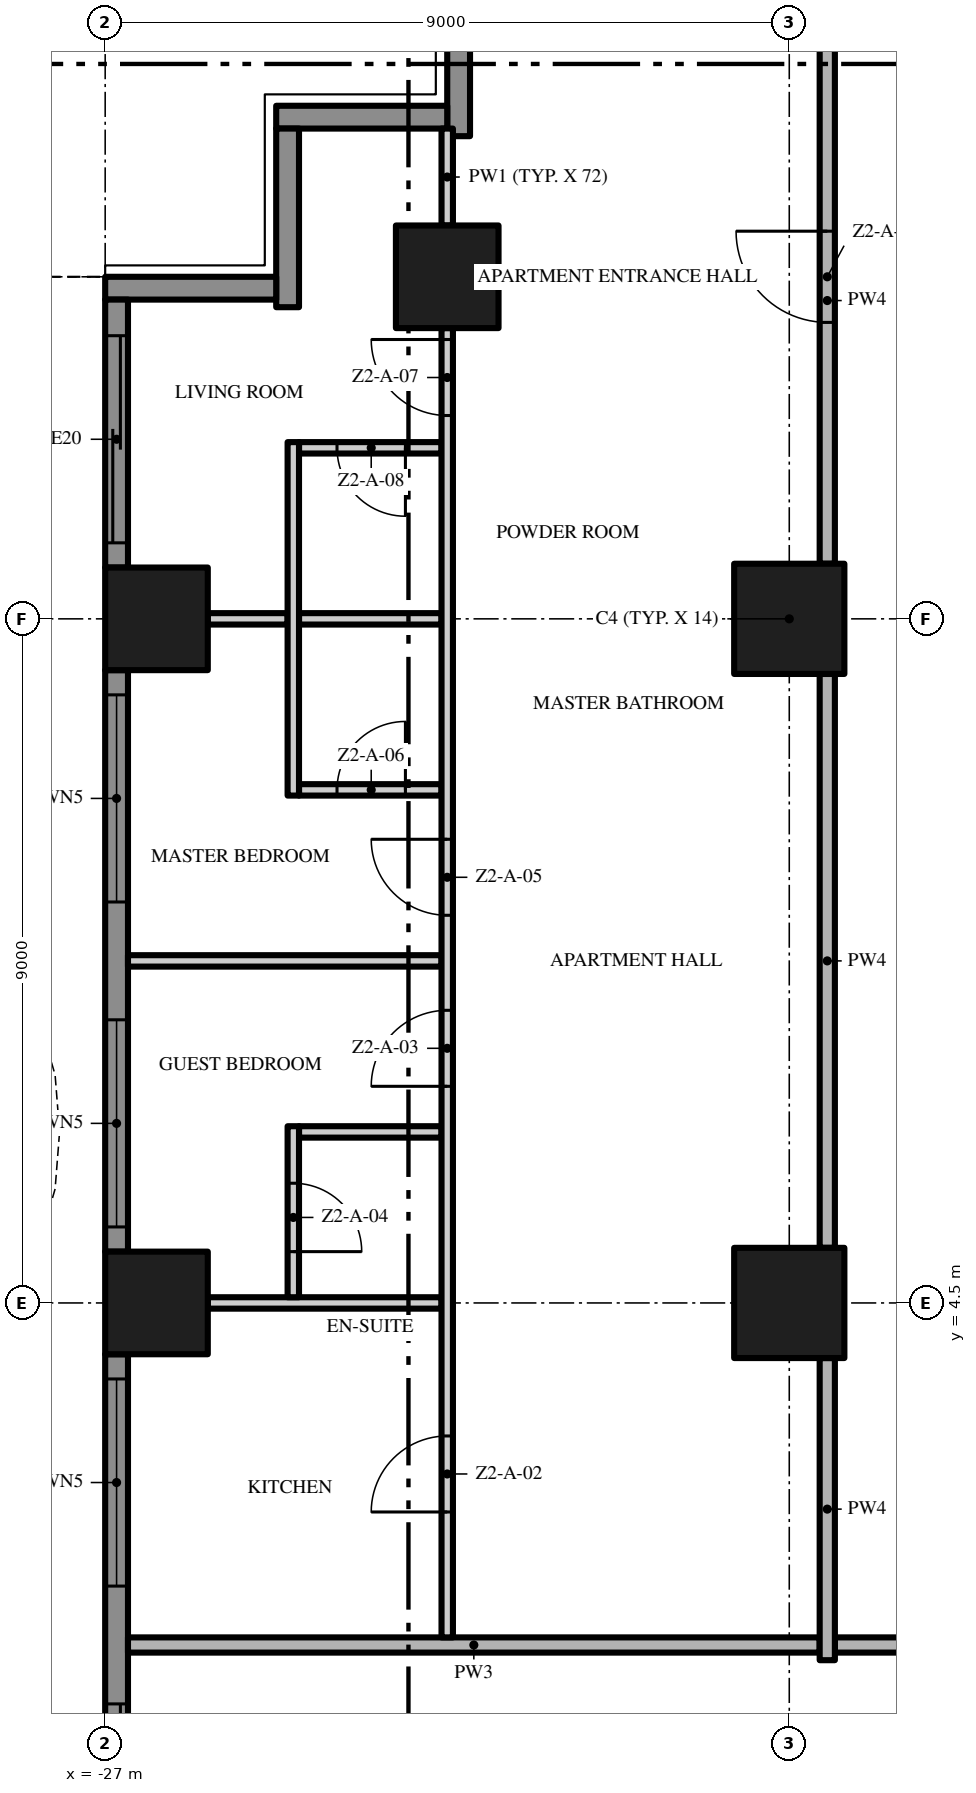
"""IFC4 building model, lengths in metres.
Left out: names, types, materials, properties, quantities, classifications, styles, units other than length and angle.
Written with IfcOpenShell. Run it as: python <this file> out.ifc"""

import sys

from ifc_helpers import new_model, si_unit, direction, frame, frame_2d, origin, origin_2d, place, context, subcontext, project, spatial, polyline, rectangle, outline, extrude, element, fill, save


model = new_model("IFC4")
c1 = context("Model", 3, precision=1e-05, world=origin(), true_north=direction((0.0, 1.0)))
c2 = subcontext(c1, "Body", "Model", "MODEL_VIEW")
j1 = project(units=[si_unit("LENGTHUNIT", "METRE"), si_unit("PLANEANGLEUNIT", "RADIAN")], contexts=[c1])
p1 = place(None, origin())
s1 = spatial("IfcSite", under=j1, at=p1, CompositionType="ELEMENT")
p2 = place(p1, origin())
s2 = spatial("IfcBuilding", under=s1, at=p2, CompositionType="ELEMENT")
p3 = place(p2, frame((0.0, 0.0, 77.0)))
s3 = spatial("IfcBuildingStorey", under=s2, at=p3, CompositionType="ELEMENT", Elevation=77.0)
for number, where, z_axis, x_axis in (
    (1, (-18.0, 13.5, 0.0), (0.0, 0.0, 1.0), (1.0, 0.0, 0.0)),
    (2, (-18.0, 4.5, 0.0), (0.0, 0.0, 1.0), (1.0, 0.0, 0.0)),
):
    element("IfcColumn", number, at=place(p3, frame(where, z_axis=z_axis, x_axis=x_axis)), inside=s3, PredefinedType="COLUMN", context=c2, shape_type="SweptSolid", body=[
        extrude(rectangle(XDim=1.45, YDim=1.45, at=origin_2d()), origin(), (0.0, 0.0, 1.0), 3.5),
    ])
for number, where, z_axis, x_axis in (
    (3, (-26.325, 13.5, 0.0), (0.0, 0.0, 1.0), (1.0, 0.0, 0.0)),
    (4, (-22.5, 18.0, 0.0), (0.0, 0.0, 1.0), (1.0, 0.0, 0.0)),
    (5, (-26.325, 4.5, 0.0), (0.0, 0.0, 1.0), (1.0, 0.0, 0.0)),
):
    element("IfcColumn", number, at=place(p3, frame(where, z_axis=z_axis, x_axis=x_axis)), inside=s3, PredefinedType="COLUMN", context=c2, shape_type="SweptSolid", body=[
        extrude(rectangle(XDim=1.35, YDim=1.35, at=origin_2d()), origin(), (0.0, 0.0, 1.0), 3.5),
    ])
p4 = place(p3, frame((-22.35, 19.85, 0.0), z_axis=(0.0, 0.0, 1.0), x_axis=(0.0, 1.0, 0.0)))
e6 = element("IfcWall", 6, at=p4, inside=s3, PredefinedType="SOLIDWALL", context=c2, shape_type="SweptSolid", body=[
    extrude(rectangle(XDim=2.35, YDim=0.3, at=frame_2d((1.175, 0.0))), origin(), (0.0, 0.0, 1.0), 3.5),
])
p5 = place(p3, frame((-24.75, 20.1, 0.0), z_axis=(0.0, 0.0, 1.0), x_axis=(1.0, 0.0, 0.0)))
e7 = element("IfcWall", 7, at=p5, inside=s3, PredefinedType="SOLIDWALL", context=c2, shape_type="SweptSolid", body=[
    extrude(rectangle(XDim=2.25, YDim=0.3, at=frame_2d((1.125, 0.0))), origin(), (0.0, 0.0, 1.0), 3.5),
])
p6 = place(p3, frame((-24.6, 17.6, 0.0), z_axis=(0.0, 0.0, 1.0), x_axis=(0.0, 1.0, 0.0)))
e8 = element("IfcWall", 8, at=p6, inside=s3, PredefinedType="SOLIDWALL", context=c2, shape_type="SweptSolid", body=[
    extrude(rectangle(XDim=2.35, YDim=0.3, at=frame_2d((1.175, 0.0))), origin(), (0.0, 0.0, 1.0), 3.5),
])
p7 = place(p3, frame((-27.0, 17.85, 0.0), z_axis=(0.0, 0.0, 1.0), x_axis=(1.0, 0.0, 0.0)))
e9 = element("IfcWall", 9, at=p7, inside=s3, PredefinedType="SOLIDWALL", context=c2, shape_type="SweptSolid", body=[
    extrude(rectangle(XDim=2.25, YDim=0.3, at=frame_2d((1.125, 0.0))), origin(), (0.0, 0.0, 1.0), 3.5),
])
p8 = place(p3, frame((-26.85, 14.175, 0.0), z_axis=(0.0, 0.0, 1.0), x_axis=(0.0, 1.0, 0.0)))
e10 = element("IfcWall", 10, at=p8, inside=s3, PredefinedType="SOLIDWALL", context=c2, shape_type="SweptSolid", body=[
    extrude(rectangle(XDim=3.525, YDim=0.3, at=frame_2d((1.762, 0.0))), origin(), (0.0, 0.0, 1.0), 3.5),
])
p9 = place(p8, frame((0.325, 0.0, 0.0)))
e11 = element("IfcOpeningElement", 11, at=p9, cuts=e10, PredefinedType="OPENING", context=c2, shape_type="SweptSolid", body=[
    extrude(rectangle(XDim=2.725, YDim=2.4, at=frame_2d((1.363, 1.2))), frame((0.0, 0.16, 0.0), z_axis=(0.0, -1.0, 0.0), x_axis=(1.0, 0.0, 0.0)), (0.0, 0.0, 1.0), 0.32),
])
p10 = place(p3, frame((-26.85, 5.175, 0.0), z_axis=(0.0, 0.0, 1.0), x_axis=(0.0, 1.0, 0.0)))
e12 = element("IfcWall", 12, at=p10, inside=s3, PredefinedType="SOLIDWALL", context=c2, shape_type="SweptSolid", body=[
    extrude(rectangle(XDim=7.65, YDim=0.3, at=frame_2d((3.825, 0.0))), origin(), (0.0, 0.0, 1.0), 3.5),
])
p11 = place(p10, frame((4.6, 0.0, 0.45)))
e13 = element("IfcOpeningElement", 13, at=p11, cuts=e12, PredefinedType="OPENING", context=c2, shape_type="SweptSolid", body=[
    extrude(rectangle(XDim=2.725, YDim=2.65, at=frame_2d((1.363, 1.325))), frame((0.0, 0.16, 0.0), z_axis=(0.0, -1.0, 0.0), x_axis=(1.0, 0.0, 0.0)), (0.0, 0.0, 1.0), 0.32),
])
p12 = place(p10, frame((0.325, 0.0, 0.45)))
e14 = element("IfcOpeningElement", 14, at=p12, cuts=e12, PredefinedType="OPENING", context=c2, shape_type="SweptSolid", body=[
    extrude(rectangle(XDim=2.725, YDim=2.65, at=frame_2d((1.363, 1.325))), frame((0.0, 0.16, 0.0), z_axis=(0.0, -1.0, 0.0), x_axis=(1.0, 0.0, 0.0)), (0.0, 0.0, 1.0), 0.32),
])
p13 = place(p3, frame((-26.85, -3.825, 0.0), z_axis=(0.0, 0.0, 1.0), x_axis=(0.0, 1.0, 0.0)))
e15 = element("IfcWall", 15, at=p13, inside=s3, PredefinedType="SOLIDWALL", context=c2, shape_type="SweptSolid", body=[
    extrude(rectangle(XDim=7.65, YDim=0.3, at=frame_2d((3.825, 0.0))), origin(), (0.0, 0.0, 1.0), 3.5),
])
p14 = place(p13, frame((4.6, 0.0, 0.45)))
e16 = element("IfcOpeningElement", 16, at=p14, cuts=e15, PredefinedType="OPENING", context=c2, shape_type="SweptSolid", body=[
    extrude(rectangle(XDim=2.725, YDim=2.65, at=frame_2d((1.363, 1.325))), frame((0.0, 0.16, 0.0), z_axis=(0.0, -1.0, 0.0), x_axis=(1.0, 0.0, 0.0)), (0.0, 0.0, 1.0), 0.32),
])
p15 = place(p13, frame((0.325, 0.0, 0.0)))
e17 = element("IfcOpeningElement", 17, at=p15, cuts=e15, PredefinedType="OPENING", context=c2, shape_type="SweptSolid", body=[
    extrude(rectangle(XDim=2.725, YDim=2.4, at=frame_2d((1.363, 1.2))), frame((0.0, 0.16, 0.0), z_axis=(0.0, -1.0, 0.0), x_axis=(1.0, 0.0, 0.0)), (0.0, 0.0, 1.0), 0.32),
])
p16 = place(p3, origin())
e18 = element("IfcWall", 18, at=p16, inside=s3, PredefinedType="USERDEFINED", context=c2, shape_type="SweptSolid", body=[
    extrude(outline(polyline([(-28.8, 18.0), (-29.505, 16.5), (-29.941, 15.0), (-30.0, 14.25), (-29.941, 13.5), (-29.505, 12.0), (-28.8, 10.5), (-28.095, 9.0), (-27.659, 7.5), (-27.6, 6.75), (-27.659, 6.0), (-28.095, 4.5), (-28.8, 3.0), (-29.505, 1.5), (-29.941, 0.0), (-30.0, -0.75), (-29.941, -1.5), (-29.505, -3.0), (-28.8, -4.5), (-28.095, -6.0), (-27.659, -7.5), (-27.6, -8.25), (-27.659, -9.0), (-28.095, -10.5), (-28.8, -12.0), (-29.505, -13.5), (-29.941, -15.0), (-30.0, -15.75), (-29.941, -16.5), (-29.505, -18.0), (-29.265, -17.93), (-29.694, -16.455), (-29.749, -15.75), (-29.694, -15.045), (-29.271, -13.589), (-28.574, -12.106), (-27.86, -10.589), (-27.411, -9.045), (-27.349, -8.25), (-27.411, -7.455), (-27.86, -5.911), (-28.574, -4.394), (-29.271, -2.911), (-29.694, -1.455), (-29.749, -0.75), (-29.694, -0.045), (-29.271, 1.411), (-28.574, 2.894), (-27.86, 4.411), (-27.411, 5.955), (-27.349, 6.75), (-27.411, 7.545), (-27.86, 9.089), (-28.574, 10.606), (-29.271, 12.089), (-29.694, 13.545), (-29.749, 14.25), (-29.694, 14.955), (-29.271, 16.411), (-28.574, 17.894), (-28.8, 18.0)])), origin(), (0.0, 0.0, 1.0), 0.9),
])
p17 = place(p3, frame((-0.1, 0.0, 0.0), z_axis=(0.0, 0.0, 1.0), x_axis=(-1.0, 0.0, 0.0)))
e19 = element("IfcWall", 19, at=p17, inside=s3, PredefinedType="PARTITIONING", context=c2, shape_type="SweptSolid", body=[
    extrude(rectangle(XDim=17.3, YDim=0.2, at=frame_2d((8.65, 0.0))), origin(), (0.0, 0.0, 1.0), 3.5),
])
p18 = place(p17, frame((8.15, 0.0, 0.0)))
e20 = element("IfcOpeningElement", 20, at=p18, cuts=e19, PredefinedType="OPENING", context=c2, shape_type="SweptSolid", body=[
    extrude(rectangle(XDim=1.5, YDim=2.4, at=frame_2d((0.75, 1.2))), frame((0.0, 0.11, 0.0), z_axis=(0.0, -1.0, 0.0), x_axis=(1.0, 0.0, 0.0)), (0.0, 0.0, 1.0), 0.22),
])
p19 = place(p3, frame((-26.7, 0.0, 0.0), z_axis=(0.0, 0.0, 1.0), x_axis=(1.0, 0.0, 0.0)))
e21 = element("IfcWall", 21, at=p19, inside=s3, PredefinedType="PARTITIONING", context=c2, shape_type="SweptSolid", body=[
    extrude(rectangle(XDim=9.1, YDim=0.2, at=frame_2d((4.55, 0.0))), origin(), (0.0, 0.0, 1.0), 3.5),
])
p20 = place(p3, frame((-25.65, 4.5, 0.0), z_axis=(0.0, 0.0, 1.0), x_axis=(1.0, 0.0, 0.0)))
e22 = element("IfcWall", 22, at=p20, inside=s3, PredefinedType="PARTITIONING", context=c2, shape_type="SweptSolid", body=[
    extrude(rectangle(XDim=3.075, YDim=0.15, at=frame_2d((1.538, 0.0))), origin(), (0.0, 0.0, 1.0), 3.5),
])
p21 = place(p3, frame((-24.45, 6.75, 0.0), z_axis=(0.0, 0.0, 1.0), x_axis=(1.0, 0.0, 0.0)))
e23 = element("IfcWall", 23, at=p21, inside=s3, PredefinedType="PARTITIONING", context=c2, shape_type="SweptSolid", body=[
    extrude(rectangle(XDim=1.875, YDim=0.15, at=frame_2d((0.938, 0.0))), origin(), (0.0, 0.0, 1.0), 3.5),
])
p22 = place(p3, frame((-26.7, 9.0, 0.0), z_axis=(0.0, 0.0, 1.0), x_axis=(1.0, 0.0, 0.0)))
e24 = element("IfcWall", 24, at=p22, inside=s3, PredefinedType="PARTITIONING", context=c2, shape_type="SweptSolid", body=[
    extrude(rectangle(XDim=4.125, YDim=0.15, at=frame_2d((2.062, 0.0))), origin(), (0.0, 0.0, 1.0), 3.5),
])
p23 = place(p3, frame((-24.45, 11.25, 0.0), z_axis=(0.0, 0.0, 1.0), x_axis=(1.0, 0.0, 0.0)))
e25 = element("IfcWall", 25, at=p23, inside=s3, PredefinedType="PARTITIONING", context=c2, shape_type="SweptSolid", body=[
    extrude(rectangle(XDim=1.875, YDim=0.15, at=frame_2d((0.938, 0.0))), origin(), (0.0, 0.0, 1.0), 3.5),
])
p24 = place(p23, frame((0.5, 0.0, 0.0)))
e26 = element("IfcOpeningElement", 26, at=p24, cuts=e25, PredefinedType="OPENING", context=c2, shape_type="SweptSolid", body=[
    extrude(rectangle(XDim=0.9, YDim=2.1, at=frame_2d((0.45, 1.05))), frame((0.0, 0.085, 0.0), z_axis=(0.0, -1.0, 0.0), x_axis=(1.0, 0.0, 0.0)), (0.0, 0.0, 1.0), 0.17),
])
p25 = place(p3, frame((-25.65, 13.5, 0.0), z_axis=(0.0, 0.0, 1.0), x_axis=(1.0, 0.0, 0.0)))
e27 = element("IfcWall", 27, at=p25, inside=s3, PredefinedType="PARTITIONING", context=c2, shape_type="SweptSolid", body=[
    extrude(rectangle(XDim=1.05, YDim=0.15, at=frame_2d((0.525, 0.0))), origin(), (0.0, 0.0, 1.0), 3.5),
])
p26 = place(p3, frame((-24.45, 13.5, 0.0), z_axis=(0.0, 0.0, 1.0), x_axis=(1.0, 0.0, 0.0)))
e28 = element("IfcWall", 28, at=p26, inside=s3, PredefinedType="PARTITIONING", context=c2, shape_type="SweptSolid", body=[
    extrude(rectangle(XDim=1.875, YDim=0.15, at=frame_2d((0.938, 0.0))), origin(), (0.0, 0.0, 1.0), 3.5),
])
p27 = place(p3, frame((-22.575, 15.75, 0.0), z_axis=(0.0, 0.0, 1.0), x_axis=(-1.0, 0.0, 0.0)))
e29 = element("IfcWall", 29, at=p27, inside=s3, PredefinedType="PARTITIONING", context=c2, shape_type="SweptSolid", body=[
    extrude(rectangle(XDim=1.875, YDim=0.15, at=frame_2d((0.938, 0.0))), origin(), (0.0, 0.0, 1.0), 3.5),
])
p28 = place(p27, frame((0.475, 0.0, 0.0)))
e30 = element("IfcOpeningElement", 30, at=p28, cuts=e29, PredefinedType="OPENING", context=c2, shape_type="SweptSolid", body=[
    extrude(rectangle(XDim=0.9, YDim=2.1, at=frame_2d((0.45, 1.05))), frame((0.0, 0.085, 0.0), z_axis=(0.0, -1.0, 0.0), x_axis=(1.0, 0.0, 0.0)), (0.0, 0.0, 1.0), 0.17),
])
p29 = place(p3, frame((-24.525, 6.825, 0.0), z_axis=(0.0, 0.0, 1.0), x_axis=(0.0, -1.0, 0.0)))
e31 = element("IfcWall", 31, at=p29, inside=s3, PredefinedType="PARTITIONING", context=c2, shape_type="SweptSolid", body=[
    extrude(rectangle(XDim=2.25, YDim=0.15, at=frame_2d((1.125, 0.0))), origin(), (0.0, 0.0, 1.0), 3.5),
])
p30 = place(p29, frame((0.75, 0.0, 0.0)))
e32 = element("IfcOpeningElement", 32, at=p30, cuts=e31, PredefinedType="OPENING", context=c2, shape_type="SweptSolid", body=[
    extrude(rectangle(XDim=0.9, YDim=2.1, at=frame_2d((0.45, 1.05))), frame((0.0, 0.085, 0.0), z_axis=(0.0, -1.0, 0.0), x_axis=(1.0, 0.0, 0.0)), (0.0, 0.0, 1.0), 0.17),
])
p31 = place(p3, frame((-24.525, 11.175, 0.0), z_axis=(0.0, 0.0, 1.0), x_axis=(0.0, 1.0, 0.0)))
e33 = element("IfcWall", 33, at=p31, inside=s3, PredefinedType="PARTITIONING", context=c2, shape_type="SweptSolid", body=[
    extrude(rectangle(XDim=4.65, YDim=0.15, at=frame_2d((2.325, 0.0))), origin(), (0.0, 0.0, 1.0), 3.5),
])
p32 = place(p3, frame((-22.5, 0.1, 0.0), z_axis=(0.0, 0.0, 1.0), x_axis=(0.0, 1.0, 0.0)))
e34 = element("IfcWall", 34, at=p32, inside=s3, PredefinedType="PARTITIONING", context=c2, shape_type="SweptSolid", body=[
    extrude(rectangle(XDim=17.225, YDim=0.15, at=frame_2d((8.613, 0.0))), origin(), (0.0, 0.0, 1.0), 3.5),
])
p33 = place(p32, frame((1.65, 0.0, 0.0)))
e35 = element("IfcOpeningElement", 35, at=p33, cuts=e34, PredefinedType="OPENING", context=c2, shape_type="SweptSolid", body=[
    extrude(rectangle(XDim=1.0, YDim=2.4, at=frame_2d((0.5, 1.2))), frame((0.0, 0.085, 0.0), z_axis=(0.0, -1.0, 0.0), x_axis=(1.0, 0.0, 0.0)), (0.0, 0.0, 1.0), 0.17),
])
p34 = place(p32, frame((7.25, 0.0, 0.0)))
e36 = element("IfcOpeningElement", 36, at=p34, cuts=e34, PredefinedType="OPENING", context=c2, shape_type="SweptSolid", body=[
    extrude(rectangle(XDim=1.0, YDim=2.4, at=frame_2d((0.5, 1.2))), frame((0.0, 0.085, 0.0), z_axis=(0.0, -1.0, 0.0), x_axis=(1.0, 0.0, 0.0)), (0.0, 0.0, 1.0), 0.17),
])
p35 = place(p32, frame((9.5, 0.0, 0.0)))
e37 = element("IfcOpeningElement", 37, at=p35, cuts=e34, PredefinedType="OPENING", context=c2, shape_type="SweptSolid", body=[
    extrude(rectangle(XDim=1.0, YDim=2.4, at=frame_2d((0.5, 1.2))), frame((0.0, 0.085, 0.0), z_axis=(0.0, -1.0, 0.0), x_axis=(1.0, 0.0, 0.0)), (0.0, 0.0, 1.0), 0.17),
])
p36 = place(p32, frame((16.075, 0.0, 0.0)))
e38 = element("IfcOpeningElement", 38, at=p36, cuts=e34, PredefinedType="OPENING", context=c2, shape_type="SweptSolid", body=[
    extrude(rectangle(XDim=1.0, YDim=2.4, at=frame_2d((0.5, 1.2))), frame((0.0, 0.085, 0.0), z_axis=(0.0, -1.0, 0.0), x_axis=(1.0, 0.0, 0.0)), (0.0, 0.0, 1.0), 0.17),
])
p37 = place(p3, frame((-22.5, 18.675, 0.0), z_axis=(0.0, 0.0, 1.0), x_axis=(0.0, 1.0, 0.0)))
e39 = element("IfcWall", 39, at=p37, inside=s3, PredefinedType="PARTITIONING", context=c2, shape_type="SweptSolid", body=[
    extrude(rectangle(XDim=1.275, YDim=0.15, at=frame_2d((0.637, 0.0))), origin(), (0.0, 0.0, 1.0), 3.5),
])
p38 = place(p3, frame((-17.5, -0.2, 0.0), z_axis=(0.0, 0.0, 1.0), x_axis=(0.0, 1.0, 0.0)))
e40 = element("IfcWall", 40, at=p38, inside=s3, PredefinedType="PARTITIONING", context=c2, shape_type="SweptSolid", body=[
    extrude(rectangle(XDim=3.975, YDim=0.2, at=frame_2d((1.988, 0.0))), origin(), (0.0, 0.0, 1.0), 3.5),
])
p39 = place(p3, frame((-17.5, 5.225, 0.0), z_axis=(0.0, 0.0, 1.0), x_axis=(0.0, 1.0, 0.0)))
e41 = element("IfcWall", 41, at=p39, inside=s3, PredefinedType="PARTITIONING", context=c2, shape_type="SweptSolid", body=[
    extrude(rectangle(XDim=7.55, YDim=0.2, at=frame_2d((3.775, 0.0))), origin(), (0.0, 0.0, 1.0), 3.5),
])
p40 = place(p3, frame((-17.5, 14.225, 0.0), z_axis=(0.0, 0.0, 1.0), x_axis=(0.0, 1.0, 0.0)))
e42 = element("IfcWall", 42, at=p40, inside=s3, PredefinedType="PARTITIONING", context=c2, shape_type="SweptSolid", body=[
    extrude(rectangle(XDim=6.925, YDim=0.2, at=frame_2d((3.462, 0.0))), origin(), (0.0, 0.0, 1.0), 3.5),
])
p41 = place(p40, frame((3.175, 0.0, 0.0)))
e43 = element("IfcOpeningElement", 43, at=p41, cuts=e42, PredefinedType="OPENING", context=c2, shape_type="SweptSolid", body=[
    extrude(rectangle(XDim=1.2, YDim=2.4, at=frame_2d((0.6, 1.2))), frame((0.0, 0.11, 0.0), z_axis=(0.0, -1.0, 0.0), x_axis=(1.0, 0.0, 0.0)), (0.0, 0.0, 1.0), 0.22),
])
p42 = place(p9, origin())
e44 = element("IfcDoor", 44, at=p42, inside=s3, OperationType="SINGLE_SWING_LEFT", PredefinedType="DOOR", context=c2, shape_type="SweptSolid", body=[
    extrude(rectangle(XDim=2.725, YDim=2.4, at=frame_2d((1.363, 1.2))), frame((0.0, 0.025, 0.0), z_axis=(0.0, -1.0, 0.0), x_axis=(1.0, 0.0, 0.0)), (0.0, 0.0, 1.0), 0.05),
])
fill(e11, e44)
p43 = place(p11, origin())
e45 = element("IfcWindow", 45, at=p43, inside=s3, PartitioningType="SINGLE_PANEL", PredefinedType="WINDOW", context=c2, shape_type="SweptSolid", body=[
    extrude(rectangle(XDim=2.725, YDim=2.65, at=frame_2d((1.363, 1.325))), frame((0.0, 0.03, 0.0), z_axis=(0.0, -1.0, 0.0), x_axis=(1.0, 0.0, 0.0)), (0.0, 0.0, 1.0), 0.06),
])
fill(e13, e45)
p44 = place(p12, origin())
e46 = element("IfcWindow", 46, at=p44, inside=s3, PartitioningType="SINGLE_PANEL", PredefinedType="WINDOW", context=c2, shape_type="SweptSolid", body=[
    extrude(rectangle(XDim=2.725, YDim=2.65, at=frame_2d((1.363, 1.325))), frame((0.0, 0.03, 0.0), z_axis=(0.0, -1.0, 0.0), x_axis=(1.0, 0.0, 0.0)), (0.0, 0.0, 1.0), 0.06),
])
fill(e14, e46)
p45 = place(p14, origin())
e47 = element("IfcWindow", 47, at=p45, inside=s3, PartitioningType="SINGLE_PANEL", PredefinedType="WINDOW", context=c2, shape_type="SweptSolid", body=[
    extrude(rectangle(XDim=2.725, YDim=2.65, at=frame_2d((1.363, 1.325))), frame((0.0, 0.03, 0.0), z_axis=(0.0, -1.0, 0.0), x_axis=(1.0, 0.0, 0.0)), (0.0, 0.0, 1.0), 0.06),
])
fill(e16, e47)
p46 = place(p15, origin())
e48 = element("IfcDoor", 48, at=p46, inside=s3, OperationType="SINGLE_SWING_LEFT", PredefinedType="DOOR", context=c2, shape_type="SweptSolid", body=[
    extrude(rectangle(XDim=2.725, YDim=2.4, at=frame_2d((1.363, 1.2))), frame((0.0, 0.025, 0.0), z_axis=(0.0, -1.0, 0.0), x_axis=(1.0, 0.0, 0.0)), (0.0, 0.0, 1.0), 0.05),
])
fill(e17, e48)
p47 = place(p41, origin())
e49 = element("IfcDoor", 49, at=p47, inside=s3, OperationType="SINGLE_SWING_RIGHT", PredefinedType="DOOR", context=c2, shape_type="SweptSolid", body=[
    extrude(rectangle(XDim=1.2, YDim=2.4, at=frame_2d((0.6, 1.2))), frame((0.0, 0.025, 0.0), z_axis=(0.0, -1.0, 0.0), x_axis=(1.0, 0.0, 0.0)), (0.0, 0.0, 1.0), 0.05),
])
fill(e43, e49)
p48 = place(p33, origin())
e50 = element("IfcDoor", 50, at=p48, inside=s3, OperationType="SINGLE_SWING_LEFT", PredefinedType="DOOR", context=c2, shape_type="SweptSolid", body=[
    extrude(rectangle(XDim=1.0, YDim=2.4, at=frame_2d((0.5, 1.2))), frame((0.0, 0.025, 0.0), z_axis=(0.0, -1.0, 0.0), x_axis=(1.0, 0.0, 0.0)), (0.0, 0.0, 1.0), 0.05),
])
fill(e35, e50)
p49 = place(p34, origin())
e51 = element("IfcDoor", 51, at=p49, inside=s3, OperationType="SINGLE_SWING_LEFT", PredefinedType="DOOR", context=c2, shape_type="SweptSolid", body=[
    extrude(rectangle(XDim=1.0, YDim=2.4, at=frame_2d((0.5, 1.2))), frame((0.0, 0.025, 0.0), z_axis=(0.0, -1.0, 0.0), x_axis=(1.0, 0.0, 0.0)), (0.0, 0.0, 1.0), 0.05),
])
fill(e36, e51)
p50 = place(p30, origin())
e52 = element("IfcDoor", 52, at=p50, inside=s3, OperationType="SINGLE_SWING_RIGHT", PredefinedType="DOOR", context=c2, shape_type="SweptSolid", body=[
    extrude(rectangle(XDim=0.9, YDim=2.1, at=frame_2d((0.45, 1.05))), frame((0.0, 0.025, 0.0), z_axis=(0.0, -1.0, 0.0), x_axis=(1.0, 0.0, 0.0)), (0.0, 0.0, 1.0), 0.05),
])
fill(e32, e52)
p51 = place(p35, origin())
e53 = element("IfcDoor", 53, at=p51, inside=s3, OperationType="SINGLE_SWING_RIGHT", PredefinedType="DOOR", context=c2, shape_type="SweptSolid", body=[
    extrude(rectangle(XDim=1.0, YDim=2.4, at=frame_2d((0.5, 1.2))), frame((0.0, 0.025, 0.0), z_axis=(0.0, -1.0, 0.0), x_axis=(1.0, 0.0, 0.0)), (0.0, 0.0, 1.0), 0.05),
])
fill(e37, e53)
p52 = place(p24, origin())
e54 = element("IfcDoor", 54, at=p52, inside=s3, OperationType="SINGLE_SWING_RIGHT", PredefinedType="DOOR", context=c2, shape_type="SweptSolid", body=[
    extrude(rectangle(XDim=0.9, YDim=2.1, at=frame_2d((0.45, 1.05))), frame((0.0, 0.025, 0.0), z_axis=(0.0, -1.0, 0.0), x_axis=(1.0, 0.0, 0.0)), (0.0, 0.0, 1.0), 0.05),
])
fill(e26, e54)
p53 = place(p36, origin())
e55 = element("IfcDoor", 55, at=p53, inside=s3, OperationType="SINGLE_SWING_RIGHT", PredefinedType="DOOR", context=c2, shape_type="SweptSolid", body=[
    extrude(rectangle(XDim=1.0, YDim=2.4, at=frame_2d((0.5, 1.2))), frame((0.0, 0.025, 0.0), z_axis=(0.0, -1.0, 0.0), x_axis=(1.0, 0.0, 0.0)), (0.0, 0.0, 1.0), 0.05),
])
fill(e38, e55)
p54 = place(p28, origin())
e56 = element("IfcDoor", 56, at=p54, inside=s3, OperationType="SINGLE_SWING_LEFT", PredefinedType="DOOR", context=c2, shape_type="SweptSolid", body=[
    extrude(rectangle(XDim=0.9, YDim=2.1, at=frame_2d((0.45, 1.05))), frame((0.0, 0.025, 0.0), z_axis=(0.0, -1.0, 0.0), x_axis=(1.0, 0.0, 0.0)), (0.0, 0.0, 1.0), 0.05),
])
fill(e30, e56)
save(model, sys.argv[1])
